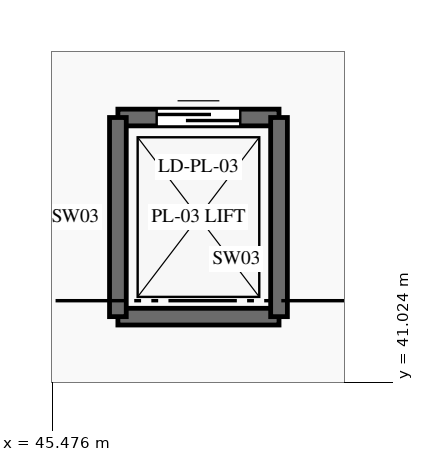
"""IFC4 building model, lengths in metres.
Left out: names, types, materials, properties, quantities, classifications, styles, units other than length and angle.
Written with IfcOpenShell. Run it as: python <this file> out.ifc"""

import sys

from ifc_helpers import new_model, si_unit, direction, frame, frame_2d, origin, place, context, subcontext, project, spatial, rectangle, extrude, element, fill, save


model = new_model("IFC4")
c1 = context("Model", 3, precision=1e-05, world=origin(), true_north=direction((0.0, 1.0)))
c2 = subcontext(c1, "Body", "Model", "MODEL_VIEW")
j1 = project(units=[si_unit("LENGTHUNIT", "METRE"), si_unit("PLANEANGLEUNIT", "RADIAN")], contexts=[c1])
p1 = place(None, origin())
s1 = spatial("IfcSite", under=j1, at=p1, CompositionType="ELEMENT")
p2 = place(p1, origin())
s2 = spatial("IfcBuilding", under=s1, at=p2, CompositionType="ELEMENT")
p3 = place(p2, origin())
s3 = spatial("IfcBuildingStorey", under=s2, at=p3, CompositionType="ELEMENT", Elevation=0.0)
p4 = place(p3, frame((46.34, 41.89, 0.0), z_axis=(0.0, 0.0, 1.0), x_axis=(1.0, 0.0, 0.0)))
e1 = element("IfcWall", 1, at=p4, inside=s3, PredefinedType="SHEAR", context=c2, shape_type="SweptSolid", body=[
    extrude(rectangle(XDim=2.12, YDim=0.22, at=frame_2d((1.06, 0.0))), origin(), (0.0, 0.0, 1.0), 6.0),
])
p5 = place(p3, frame((46.34, 44.51, 0.0), z_axis=(0.0, 0.0, 1.0), x_axis=(1.0, 0.0, 0.0)))
e2 = element("IfcWall", 2, at=p5, inside=s3, PredefinedType="SHEAR", context=c2, shape_type="SweptSolid", body=[
    extrude(rectangle(XDim=2.12, YDim=0.22, at=frame_2d((1.06, 0.0))), origin(), (0.0, 0.0, 1.0), 6.0),
])
p6 = place(p5, frame((0.51, 0.0, 0.0)))
e3 = element("IfcOpeningElement", 3, at=p6, cuts=e2, PredefinedType="OPENING", context=c2, shape_type="SweptSolid", body=[
    extrude(rectangle(XDim=1.1, YDim=2.15, at=frame_2d((0.55, 1.075))), frame((0.0, 0.125, 0.0), z_axis=(0.0, -1.0, 0.0), x_axis=(1.0, 0.0, 0.0)), (0.0, 0.0, 1.0), 0.25),
])
for number, where, z_axis, x_axis in (
    (4, (46.34, 41.89, 0.0), (0.0, 0.0, 1.0), (0.0, 1.0, 0.0)),
    (5, (48.46, 41.89, 0.0), (0.0, 0.0, 1.0), (0.0, 1.0, 0.0)),
):
    element("IfcWall", number, at=place(p3, frame(where, z_axis=z_axis, x_axis=x_axis)), inside=s3, PredefinedType="SHEAR", context=c2, shape_type="SweptSolid", body=[
        extrude(rectangle(XDim=2.62, YDim=0.22, at=frame_2d((1.31, 0.0))), origin(), (0.0, 0.0, 1.0), 6.0),
    ])
p7 = place(p6, origin())
e6 = element("IfcDoor", 6, at=p7, inside=s3, OperationType="SLIDING_TO_LEFT", PredefinedType="DOOR", context=c2, shape_type="SweptSolid", body=[
    extrude(rectangle(XDim=1.1, YDim=2.15, at=frame_2d((0.55, 1.075))), frame((0.0, 0.025, 0.0), z_axis=(0.0, -1.0, 0.0), x_axis=(1.0, 0.0, 0.0)), (0.0, 0.0, 1.0), 0.05),
])
fill(e3, e6)
save(model, sys.argv[1])
